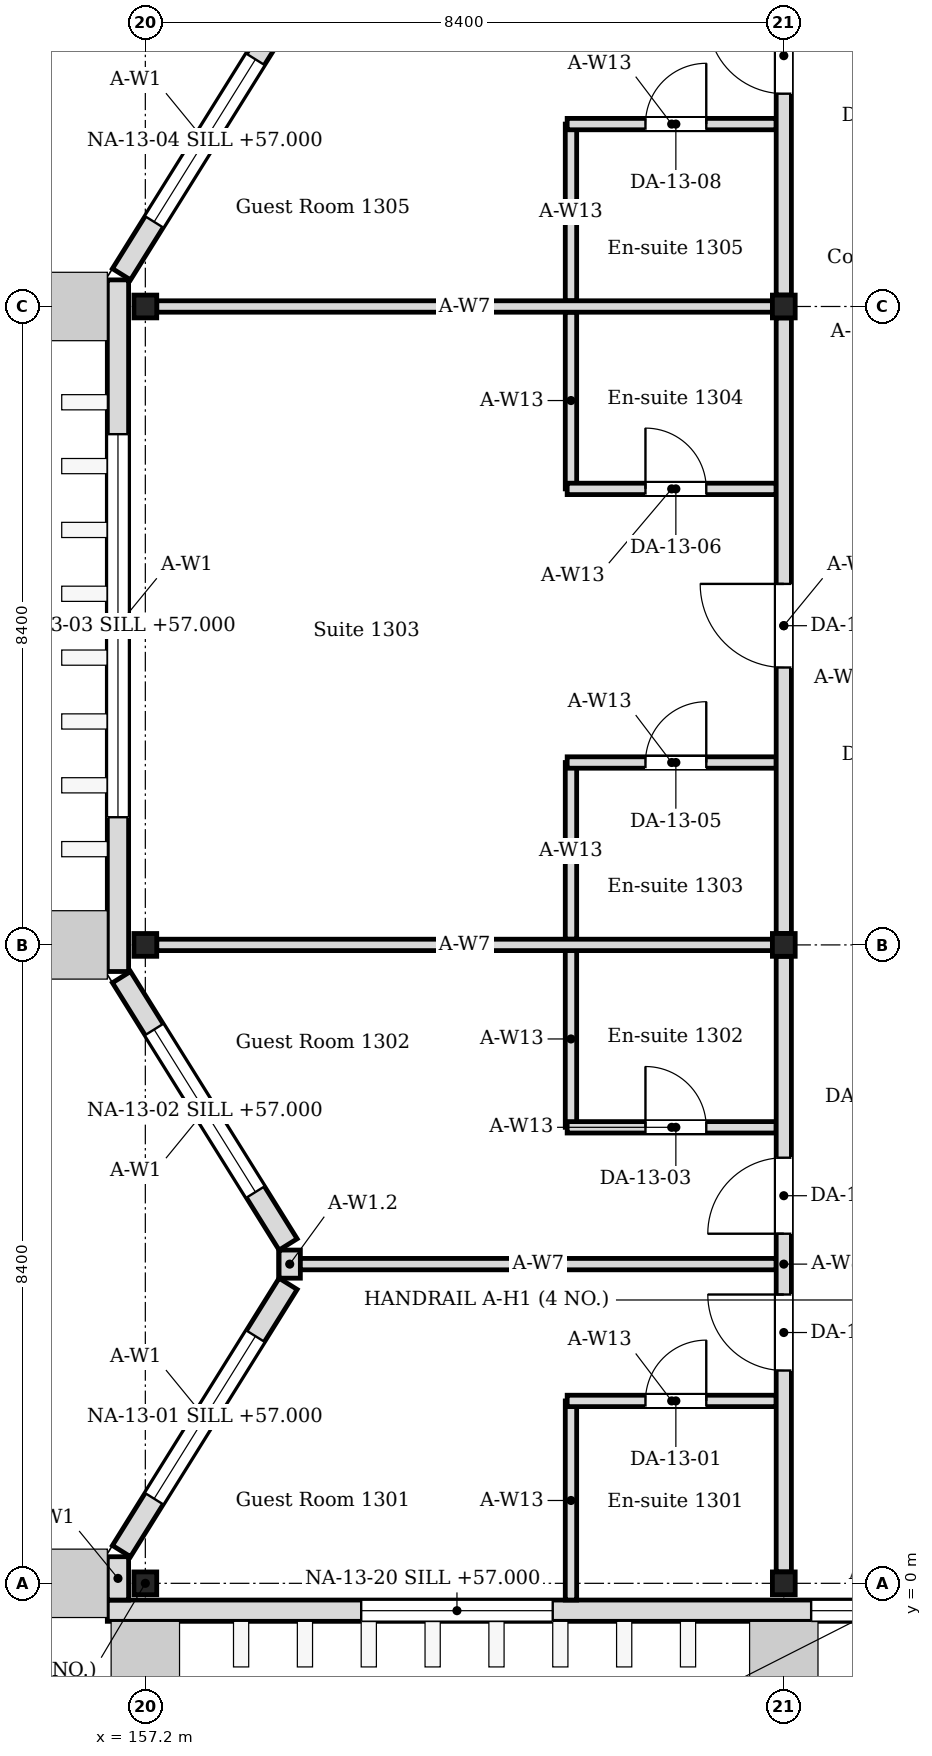
"""IFC4 building model, lengths in metres.
Left out: names, types, materials, properties, quantities, classifications, styles, units other than length and angle.
Written with IfcOpenShell. Run it as: python <this file> out.ifc"""

import sys

from ifc_helpers import new_model, si_unit, direction, frame, frame_2d, origin, origin_2d, place, context, subcontext, project, spatial, rectangle, i_section, extrude, element, fill, save


model = new_model("IFC4")
c1 = context("Model", 3, precision=1e-05, world=origin(), true_north=direction((0.0, 1.0)))
c2 = subcontext(c1, "Body", "Model", "MODEL_VIEW")
j1 = project(units=[si_unit("LENGTHUNIT", "METRE"), si_unit("PLANEANGLEUNIT", "RADIAN")], contexts=[c1])
p1 = place(None, origin())
s1 = spatial("IfcSite", under=j1, at=p1, CompositionType="ELEMENT")
p2 = place(p1, origin())
s2 = spatial("IfcBuilding", under=s1, at=p2, CompositionType="ELEMENT")
p3 = place(p2, frame((0.0, 0.0, 56.4)))
s3 = spatial("IfcBuildingStorey", under=s2, at=p3, CompositionType="ELEMENT", Elevation=56.4)
for number, where, z_axis, x_axis in (
    (1, (157.2, 0.0, 0.0), (0.0, 0.0, 1.0), (1.0, 0.0, 0.0)),
    (2, (157.2, 8.4, 0.0), (0.0, 0.0, 1.0), (1.0, 0.0, 0.0)),
    (3, (157.2, 16.8, 0.0), (0.0, 0.0, 1.0), (1.0, 0.0, 0.0)),
    (4, (165.6, 0.0, 0.0), (0.0, 0.0, 1.0), (1.0, 0.0, 0.0)),
    (5, (165.6, 8.4, 0.0), (0.0, 0.0, 1.0), (1.0, 0.0, 0.0)),
    (6, (165.6, 16.8, 0.0), (0.0, 0.0, 1.0), (1.0, 0.0, 0.0)),
):
    element("IfcColumn", number, at=place(p3, frame(where, z_axis=z_axis, x_axis=x_axis)), inside=s3, PredefinedType="COLUMN", context=c2, shape_type="SweptSolid", body=[
        extrude(i_section(OverallWidth=0.3, OverallDepth=0.3, WebThickness=0.01, FlangeThickness=0.015, FilletRadius=0.013, at=origin_2d()), origin(), (0.0, 0.0, 1.0), 4.2),
    ])
p4 = place(p3, frame((156.84, -0.22, 0.0), z_axis=(0.0, 0.0, 1.0), x_axis=(0.0, 1.0, 0.0)))
e7 = element("IfcWall", 7, at=p4, inside=s3, PredefinedType="SOLIDWALL", context=c2, shape_type="SweptSolid", body=[
    extrude(rectangle(XDim=0.57, YDim=0.28, at=frame_2d((0.285, 0.0))), origin(), (0.0, 0.0, 1.0), 4.05),
])
p5 = place(p3, frame((156.886, 0.424, 0.0), z_axis=(0.0, 0.0, 1.0), x_axis=(0.529018946142, 0.848610013271, 0.0)))
e8 = element("IfcWall", 8, at=p5, inside=s3, PredefinedType="SOLIDWALL", context=c2, shape_type="SweptSolid", body=[
    extrude(rectangle(XDim=4.144, YDim=0.28, at=frame_2d((2.072, 0.0))), origin(), (0.0, 0.0, 1.0), 4.05),
])
p6 = place(p5, frame((0.812, 0.0, 0.6)))
e9 = element("IfcOpeningElement", 9, at=p6, cuts=e8, PredefinedType="OPENING", context=c2, shape_type="SweptSolid", body=[
    extrude(rectangle(XDim=2.52, YDim=2.4, at=frame_2d((1.26, 1.2))), frame((0.0, 0.15, 0.0), z_axis=(0.0, -1.0, 0.0), x_axis=(1.0, 0.0, 0.0)), (0.0, 0.0, 1.0), 0.3),
])
p7 = place(p3, frame((159.079, 4.459, 0.0), z_axis=(0.0, 0.0, 1.0), x_axis=(-0.529018946142, 0.848610013271, 0.0)))
e10 = element("IfcWall", 10, at=p7, inside=s3, PredefinedType="SOLIDWALL", context=c2, shape_type="SweptSolid", body=[
    extrude(rectangle(XDim=4.144, YDim=0.28, at=frame_2d((2.072, 0.0))), origin(), (0.0, 0.0, 1.0), 4.05),
])
p8 = place(p7, frame((0.812, 0.0, 0.6)))
e11 = element("IfcOpeningElement", 11, at=p8, cuts=e10, PredefinedType="OPENING", context=c2, shape_type="SweptSolid", body=[
    extrude(rectangle(XDim=2.52, YDim=2.4, at=frame_2d((1.26, 1.2))), frame((0.0, 0.15, 0.0), z_axis=(0.0, -1.0, 0.0), x_axis=(1.0, 0.0, 0.0)), (0.0, 0.0, 1.0), 0.3),
])
p9 = place(p3, frame((159.1, 4.015, 0.0), z_axis=(0.0, 0.0, 1.0), x_axis=(0.0, 1.0, 0.0)))
e12 = element("IfcWall", 12, at=p9, inside=s3, PredefinedType="SOLIDWALL", context=c2, shape_type="SweptSolid", body=[
    extrude(rectangle(XDim=0.37, YDim=0.28, at=frame_2d((0.185, 0.0))), origin(), (0.0, 0.0, 1.0), 3.604),
])
p10 = place(p3, frame((156.84, 8.05, 0.0), z_axis=(0.0, 0.0, 1.0), x_axis=(0.0, 1.0, 0.0)))
e13 = element("IfcWall", 13, at=p10, inside=s3, PredefinedType="SOLIDWALL", context=c2, shape_type="SweptSolid", body=[
    extrude(rectangle(XDim=9.1, YDim=0.28, at=frame_2d((4.55, 0.0))), origin(), (0.0, 0.0, 1.0), 4.05),
])
p11 = place(p10, frame((2.03, 0.0, 0.6)))
e14 = element("IfcOpeningElement", 14, at=p11, cuts=e13, PredefinedType="OPENING", context=c2, shape_type="SweptSolid", body=[
    extrude(rectangle(XDim=5.04, YDim=2.4, at=frame_2d((2.52, 1.2))), frame((0.0, 0.15, 0.0), z_axis=(0.0, -1.0, 0.0), x_axis=(1.0, 0.0, 0.0)), (0.0, 0.0, 1.0), 0.3),
])
p12 = place(p3, frame((156.886, 17.224, 0.0), z_axis=(0.0, 0.0, 1.0), x_axis=(0.529018946142, 0.848610013271, 0.0)))
e15 = element("IfcWall", 15, at=p12, inside=s3, PredefinedType="SOLIDWALL", context=c2, shape_type="SweptSolid", body=[
    extrude(rectangle(XDim=4.144, YDim=0.28, at=frame_2d((2.072, 0.0))), origin(), (0.0, 0.0, 1.0), 4.05),
])
p13 = place(p12, frame((0.812, 0.0, 0.6)))
e16 = element("IfcOpeningElement", 16, at=p13, cuts=e15, PredefinedType="OPENING", context=c2, shape_type="SweptSolid", body=[
    extrude(rectangle(XDim=2.52, YDim=2.4, at=frame_2d((1.26, 1.2))), frame((0.0, 0.15, 0.0), z_axis=(0.0, -1.0, 0.0), x_axis=(1.0, 0.0, 0.0)), (0.0, 0.0, 1.0), 0.3),
])
p14 = place(p3, frame((156.7, -0.36, 0.0), z_axis=(0.0, 0.0, 1.0), x_axis=(1.0, 0.0, 0.0)))
e17 = element("IfcWall", 17, at=p14, inside=s3, PredefinedType="SOLIDWALL", context=c2, shape_type="SweptSolid", body=[
    extrude(rectangle(XDim=20.2, YDim=0.28, at=frame_2d((10.1, 0.0))), origin(), (0.0, 0.0, 1.0), 4.05),
])
p15 = place(p14, frame((9.26, 0.0, 0.6)))
e18 = element("IfcOpeningElement", 18, at=p15, cuts=e17, PredefinedType="OPENING", context=c2, shape_type="SweptSolid", body=[
    extrude(rectangle(XDim=1.68, YDim=2.4, at=frame_2d((0.84, 1.2))), frame((0.0, 0.15, 0.0), z_axis=(0.0, -1.0, 0.0), x_axis=(1.0, 0.0, 0.0)), (0.0, 0.0, 1.0), 0.3),
])
p16 = place(p14, frame((3.34, 0.0, 0.6)))
e19 = element("IfcOpeningElement", 19, at=p16, cuts=e17, PredefinedType="OPENING", context=c2, shape_type="SweptSolid", body=[
    extrude(rectangle(XDim=2.52, YDim=2.4, at=frame_2d((1.26, 1.2))), frame((0.0, 0.15, 0.0), z_axis=(0.0, -1.0, 0.0), x_axis=(1.0, 0.0, 0.0)), (0.0, 0.0, 1.0), 0.3),
])
p17 = place(p3, frame((162.8, -0.22, 0.0), z_axis=(0.0, 0.0, 1.0), x_axis=(0.0, 1.0, 0.0)))
e20 = element("IfcWall", 20, at=p17, inside=s3, PredefinedType="PARTITIONING", context=c2, shape_type="SweptSolid", body=[
    extrude(rectangle(XDim=2.62, YDim=0.15, at=frame_2d((1.31, 0.0))), origin(), (0.0, 0.0, 1.0), 4.05),
])
p18 = place(p3, frame((162.75, 2.4, 0.0), z_axis=(0.0, 0.0, 1.0), x_axis=(1.0, 0.0, 0.0)))
e21 = element("IfcWall", 21, at=p18, inside=s3, PredefinedType="PARTITIONING", context=c2, shape_type="SweptSolid", body=[
    extrude(rectangle(XDim=2.75, YDim=0.15, at=frame_2d((1.375, 0.0))), origin(), (0.0, 0.0, 1.0), 4.05),
])
p19 = place(p18, frame((1.03, 0.0, 0.0)))
e22 = element("IfcOpeningElement", 22, at=p19, cuts=e21, PredefinedType="OPENING", context=c2, shape_type="SweptSolid", body=[
    extrude(rectangle(XDim=0.8, YDim=2.1, at=frame_2d((0.4, 1.05))), frame((0.0, 0.085, 0.0), z_axis=(0.0, -1.0, 0.0), x_axis=(1.0, 0.0, 0.0)), (0.0, 0.0, 1.0), 0.17),
])
p20 = place(p3, frame((162.8, 6.0, 0.0), z_axis=(0.0, 0.0, 1.0), x_axis=(0.0, 1.0, 0.0)))
e23 = element("IfcWall", 23, at=p20, inside=s3, PredefinedType="PARTITIONING", context=c2, shape_type="SweptSolid", body=[
    extrude(rectangle(XDim=2.325, YDim=0.15, at=frame_2d((1.163, 0.0))), origin(), (0.0, 0.0, 1.0), 4.05),
])
p21 = place(p3, frame((162.75, 6.0, 0.0), z_axis=(0.0, 0.0, 1.0), x_axis=(1.0, 0.0, 0.0)))
e24 = element("IfcWall", 24, at=p21, inside=s3, PredefinedType="PARTITIONING", context=c2, shape_type="SweptSolid", body=[
    extrude(rectangle(XDim=2.75, YDim=0.15, at=frame_2d((1.375, 0.0))), origin(), (0.0, 0.0, 1.0), 4.05),
])
p22 = place(p21, frame((1.03, 0.0, 0.0)))
e25 = element("IfcOpeningElement", 25, at=p22, cuts=e24, PredefinedType="OPENING", context=c2, shape_type="SweptSolid", body=[
    extrude(rectangle(XDim=0.8, YDim=2.1, at=frame_2d((0.4, 1.05))), frame((0.0, 0.085, 0.0), z_axis=(0.0, -1.0, 0.0), x_axis=(1.0, 0.0, 0.0)), (0.0, 0.0, 1.0), 0.17),
])
p23 = place(p3, frame((162.8, 8.475, 0.0), z_axis=(0.0, 0.0, 1.0), x_axis=(0.0, 1.0, 0.0)))
e26 = element("IfcWall", 26, at=p23, inside=s3, PredefinedType="PARTITIONING", context=c2, shape_type="SweptSolid", body=[
    extrude(rectangle(XDim=2.325, YDim=0.15, at=frame_2d((1.163, 0.0))), origin(), (0.0, 0.0, 1.0), 4.05),
])
p24 = place(p3, frame((162.75, 10.8, 0.0), z_axis=(0.0, 0.0, 1.0), x_axis=(1.0, 0.0, 0.0)))
e27 = element("IfcWall", 27, at=p24, inside=s3, PredefinedType="PARTITIONING", context=c2, shape_type="SweptSolid", body=[
    extrude(rectangle(XDim=2.75, YDim=0.15, at=frame_2d((1.375, 0.0))), origin(), (0.0, 0.0, 1.0), 4.05),
])
p25 = place(p24, frame((1.03, 0.0, 0.0)))
e28 = element("IfcOpeningElement", 28, at=p25, cuts=e27, PredefinedType="OPENING", context=c2, shape_type="SweptSolid", body=[
    extrude(rectangle(XDim=0.8, YDim=2.1, at=frame_2d((0.4, 1.05))), frame((0.0, 0.085, 0.0), z_axis=(0.0, -1.0, 0.0), x_axis=(1.0, 0.0, 0.0)), (0.0, 0.0, 1.0), 0.17),
])
p26 = place(p3, frame((162.8, 14.4, 0.0), z_axis=(0.0, 0.0, 1.0), x_axis=(0.0, 1.0, 0.0)))
e29 = element("IfcWall", 29, at=p26, inside=s3, PredefinedType="PARTITIONING", context=c2, shape_type="SweptSolid", body=[
    extrude(rectangle(XDim=2.325, YDim=0.15, at=frame_2d((1.163, 0.0))), origin(), (0.0, 0.0, 1.0), 4.05),
])
p27 = place(p3, frame((162.75, 14.4, 0.0), z_axis=(0.0, 0.0, 1.0), x_axis=(1.0, 0.0, 0.0)))
e30 = element("IfcWall", 30, at=p27, inside=s3, PredefinedType="PARTITIONING", context=c2, shape_type="SweptSolid", body=[
    extrude(rectangle(XDim=2.75, YDim=0.15, at=frame_2d((1.375, 0.0))), origin(), (0.0, 0.0, 1.0), 4.05),
])
p28 = place(p27, frame((1.03, 0.0, 0.0)))
e31 = element("IfcOpeningElement", 31, at=p28, cuts=e30, PredefinedType="OPENING", context=c2, shape_type="SweptSolid", body=[
    extrude(rectangle(XDim=0.8, YDim=2.1, at=frame_2d((0.4, 1.05))), frame((0.0, 0.085, 0.0), z_axis=(0.0, -1.0, 0.0), x_axis=(1.0, 0.0, 0.0)), (0.0, 0.0, 1.0), 0.17),
])
p29 = place(p3, frame((162.8, 16.875, 0.0), z_axis=(0.0, 0.0, 1.0), x_axis=(0.0, 1.0, 0.0)))
e32 = element("IfcWall", 32, at=p29, inside=s3, PredefinedType="PARTITIONING", context=c2, shape_type="SweptSolid", body=[
    extrude(rectangle(XDim=2.325, YDim=0.15, at=frame_2d((1.163, 0.0))), origin(), (0.0, 0.0, 1.0), 4.05),
])
p30 = place(p3, frame((162.75, 19.2, 0.0), z_axis=(0.0, 0.0, 1.0), x_axis=(1.0, 0.0, 0.0)))
e33 = element("IfcWall", 33, at=p30, inside=s3, PredefinedType="PARTITIONING", context=c2, shape_type="SweptSolid", body=[
    extrude(rectangle(XDim=2.75, YDim=0.15, at=frame_2d((1.375, 0.0))), origin(), (0.0, 0.0, 1.0), 4.05),
])
p31 = place(p30, frame((1.03, 0.0, 0.0)))
e34 = element("IfcOpeningElement", 34, at=p31, cuts=e33, PredefinedType="OPENING", context=c2, shape_type="SweptSolid", body=[
    extrude(rectangle(XDim=0.8, YDim=2.1, at=frame_2d((0.4, 1.05))), frame((0.0, 0.085, 0.0), z_axis=(0.0, -1.0, 0.0), x_axis=(1.0, 0.0, 0.0)), (0.0, 0.0, 1.0), 0.17),
])
for number, where, z_axis, x_axis in (
    (35, (157.35, 8.4, 0.0), (0.0, 0.0, 1.0), (1.0, 0.0, 0.0)),
    (36, (157.35, 16.8, 0.0), (0.0, 0.0, 1.0), (1.0, 0.0, 0.0)),
):
    element("IfcWall", number, at=place(p3, frame(where, z_axis=z_axis, x_axis=x_axis)), inside=s3, PredefinedType="PARTITIONING", context=c2, shape_type="SweptSolid", body=[
        extrude(rectangle(XDim=8.1, YDim=0.15, at=frame_2d((4.05, 0.0))), origin(), (0.0, 0.0, 1.0), 3.604),
    ])
p32 = place(p3, frame((159.24, 4.2, 0.0), z_axis=(0.0, 0.0, 1.0), x_axis=(1.0, 0.0, 0.0)))
e37 = element("IfcWall", 37, at=p32, inside=s3, PredefinedType="PARTITIONING", context=c2, shape_type="SweptSolid", body=[
    extrude(rectangle(XDim=6.26, YDim=0.15, at=frame_2d((3.13, 0.0))), origin(), (0.0, 0.0, 1.0), 3.604),
])
p33 = place(p3, frame((165.6, 0.15, 0.0), z_axis=(0.0, 0.0, 1.0), x_axis=(0.0, 1.0, 0.0)))
e38 = element("IfcWall", 38, at=p33, inside=s3, PredefinedType="PARTITIONING", context=c2, shape_type="SweptSolid", body=[
    extrude(rectangle(XDim=8.1, YDim=0.2, at=frame_2d((4.05, 0.0))), origin(), (0.0, 0.0, 1.0), 3.45),
])
p34 = place(p33, frame((2.65, 0.0, 0.0)))
e39 = element("IfcOpeningElement", 39, at=p34, cuts=e38, PredefinedType="OPENING", context=c2, shape_type="SweptSolid", body=[
    extrude(rectangle(XDim=1.0, YDim=2.4, at=frame_2d((0.5, 1.2))), frame((0.0, 0.11, 0.0), z_axis=(0.0, -1.0, 0.0), x_axis=(1.0, 0.0, 0.0)), (0.0, 0.0, 1.0), 0.22),
])
p35 = place(p33, frame((4.45, 0.0, 0.0)))
e40 = element("IfcOpeningElement", 40, at=p35, cuts=e38, PredefinedType="OPENING", context=c2, shape_type="SweptSolid", body=[
    extrude(rectangle(XDim=1.0, YDim=2.4, at=frame_2d((0.5, 1.2))), frame((0.0, 0.11, 0.0), z_axis=(0.0, -1.0, 0.0), x_axis=(1.0, 0.0, 0.0)), (0.0, 0.0, 1.0), 0.22),
])
p36 = place(p3, frame((165.6, 8.55, 0.0), z_axis=(0.0, 0.0, 1.0), x_axis=(0.0, 1.0, 0.0)))
e41 = element("IfcWall", 41, at=p36, inside=s3, PredefinedType="PARTITIONING", context=c2, shape_type="SweptSolid", body=[
    extrude(rectangle(XDim=8.1, YDim=0.2, at=frame_2d((4.05, 0.0))), origin(), (0.0, 0.0, 1.0), 3.45),
])
p37 = place(p36, frame((3.5, 0.0, 0.0)))
e42 = element("IfcOpeningElement", 42, at=p37, cuts=e41, PredefinedType="OPENING", context=c2, shape_type="SweptSolid", body=[
    extrude(rectangle(XDim=1.1, YDim=2.4, at=frame_2d((0.55, 1.2))), frame((0.0, 0.11, 0.0), z_axis=(0.0, -1.0, 0.0), x_axis=(1.0, 0.0, 0.0)), (0.0, 0.0, 1.0), 0.22),
])
p38 = place(p3, frame((165.6, 16.95, 0.0), z_axis=(0.0, 0.0, 1.0), x_axis=(0.0, 1.0, 0.0)))
e43 = element("IfcWall", 43, at=p38, inside=s3, PredefinedType="PARTITIONING", context=c2, shape_type="SweptSolid", body=[
    extrude(rectangle(XDim=8.1, YDim=0.2, at=frame_2d((4.05, 0.0))), origin(), (0.0, 0.0, 1.0), 3.45),
])
p39 = place(p38, frame((2.65, 0.0, 0.0)))
e44 = element("IfcOpeningElement", 44, at=p39, cuts=e43, PredefinedType="OPENING", context=c2, shape_type="SweptSolid", body=[
    extrude(rectangle(XDim=1.0, YDim=2.4, at=frame_2d((0.5, 1.2))), frame((0.0, 0.11, 0.0), z_axis=(0.0, -1.0, 0.0), x_axis=(1.0, 0.0, 0.0)), (0.0, 0.0, 1.0), 0.22),
])
p40 = place(p38, frame((4.45, 0.0, 0.0)))
e45 = element("IfcOpeningElement", 45, at=p40, cuts=e43, PredefinedType="OPENING", context=c2, shape_type="SweptSolid", body=[
    extrude(rectangle(XDim=1.0, YDim=2.4, at=frame_2d((0.5, 1.2))), frame((0.0, 0.11, 0.0), z_axis=(0.0, -1.0, 0.0), x_axis=(1.0, 0.0, 0.0)), (0.0, 0.0, 1.0), 0.22),
])
p41 = place(p6, origin())
e46 = element("IfcWindow", 46, at=p41, inside=s3, PartitioningType="SINGLE_PANEL", PredefinedType="WINDOW", context=c2, shape_type="SweptSolid", body=[
    extrude(rectangle(XDim=2.52, YDim=2.4, at=frame_2d((1.26, 1.2))), frame((0.0, 0.03, 0.0), z_axis=(0.0, -1.0, 0.0), x_axis=(1.0, 0.0, 0.0)), (0.0, 0.0, 1.0), 0.06),
])
fill(e9, e46)
p42 = place(p8, origin())
e47 = element("IfcWindow", 47, at=p42, inside=s3, PartitioningType="SINGLE_PANEL", PredefinedType="WINDOW", context=c2, shape_type="SweptSolid", body=[
    extrude(rectangle(XDim=2.52, YDim=2.4, at=frame_2d((1.26, 1.2))), frame((0.0, 0.03, 0.0), z_axis=(0.0, -1.0, 0.0), x_axis=(1.0, 0.0, 0.0)), (0.0, 0.0, 1.0), 0.06),
])
fill(e11, e47)
p43 = place(p11, origin())
e48 = element("IfcWindow", 48, at=p43, inside=s3, PartitioningType="SINGLE_PANEL", PredefinedType="WINDOW", context=c2, shape_type="SweptSolid", body=[
    extrude(rectangle(XDim=5.04, YDim=2.4, at=frame_2d((2.52, 1.2))), frame((0.0, 0.03, 0.0), z_axis=(0.0, -1.0, 0.0), x_axis=(1.0, 0.0, 0.0)), (0.0, 0.0, 1.0), 0.06),
])
fill(e14, e48)
p44 = place(p13, origin())
e49 = element("IfcWindow", 49, at=p44, inside=s3, PartitioningType="SINGLE_PANEL", PredefinedType="WINDOW", context=c2, shape_type="SweptSolid", body=[
    extrude(rectangle(XDim=2.52, YDim=2.4, at=frame_2d((1.26, 1.2))), frame((0.0, 0.03, 0.0), z_axis=(0.0, -1.0, 0.0), x_axis=(1.0, 0.0, 0.0)), (0.0, 0.0, 1.0), 0.06),
])
fill(e16, e49)
p45 = place(p15, origin())
e50 = element("IfcWindow", 50, at=p45, inside=s3, PartitioningType="SINGLE_PANEL", PredefinedType="WINDOW", context=c2, shape_type="SweptSolid", body=[
    extrude(rectangle(XDim=1.68, YDim=2.4, at=frame_2d((0.84, 1.2))), frame((0.0, 0.03, 0.0), z_axis=(0.0, -1.0, 0.0), x_axis=(1.0, 0.0, 0.0)), (0.0, 0.0, 1.0), 0.06),
])
fill(e18, e50)
p46 = place(p16, origin())
e51 = element("IfcWindow", 51, at=p46, inside=s3, PartitioningType="SINGLE_PANEL", PredefinedType="WINDOW", context=c2, shape_type="SweptSolid", body=[
    extrude(rectangle(XDim=2.52, YDim=2.4, at=frame_2d((1.26, 1.2))), frame((0.0, 0.03, 0.0), z_axis=(0.0, -1.0, 0.0), x_axis=(1.0, 0.0, 0.0)), (0.0, 0.0, 1.0), 0.06),
])
fill(e19, e51)
p47 = place(p19, origin())
e52 = element("IfcDoor", 52, at=p47, inside=s3, OperationType="SINGLE_SWING_RIGHT", PredefinedType="DOOR", context=c2, shape_type="SweptSolid", body=[
    extrude(rectangle(XDim=0.8, YDim=2.1, at=frame_2d((0.4, 1.05))), frame((0.0, 0.025, 0.0), z_axis=(0.0, -1.0, 0.0), x_axis=(1.0, 0.0, 0.0)), (0.0, 0.0, 1.0), 0.05),
])
fill(e22, e52)
p48 = place(p34, origin())
e53 = element("IfcDoor", 53, at=p48, inside=s3, OperationType="SINGLE_SWING_RIGHT", PredefinedType="DOOR", context=c2, shape_type="SweptSolid", body=[
    extrude(rectangle(XDim=1.0, YDim=2.4, at=frame_2d((0.5, 1.2))), frame((0.0, 0.025, 0.0), z_axis=(0.0, -1.0, 0.0), x_axis=(1.0, 0.0, 0.0)), (0.0, 0.0, 1.0), 0.05),
])
fill(e39, e53)
p49 = place(p22, origin())
e54 = element("IfcDoor", 54, at=p49, inside=s3, OperationType="SINGLE_SWING_LEFT", PredefinedType="DOOR", context=c2, shape_type="SweptSolid", body=[
    extrude(rectangle(XDim=0.8, YDim=2.1, at=frame_2d((0.4, 1.05))), frame((0.0, 0.025, 0.0), z_axis=(0.0, -1.0, 0.0), x_axis=(1.0, 0.0, 0.0)), (0.0, 0.0, 1.0), 0.05),
])
fill(e25, e54)
p50 = place(p35, origin())
e55 = element("IfcDoor", 55, at=p50, inside=s3, OperationType="SINGLE_SWING_LEFT", PredefinedType="DOOR", context=c2, shape_type="SweptSolid", body=[
    extrude(rectangle(XDim=1.0, YDim=2.4, at=frame_2d((0.5, 1.2))), frame((0.0, 0.025, 0.0), z_axis=(0.0, -1.0, 0.0), x_axis=(1.0, 0.0, 0.0)), (0.0, 0.0, 1.0), 0.05),
])
fill(e40, e55)
p51 = place(p25, origin())
e56 = element("IfcDoor", 56, at=p51, inside=s3, OperationType="SINGLE_SWING_RIGHT", PredefinedType="DOOR", context=c2, shape_type="SweptSolid", body=[
    extrude(rectangle(XDim=0.8, YDim=2.1, at=frame_2d((0.4, 1.05))), frame((0.0, 0.025, 0.0), z_axis=(0.0, -1.0, 0.0), x_axis=(1.0, 0.0, 0.0)), (0.0, 0.0, 1.0), 0.05),
])
fill(e28, e56)
p52 = place(p28, origin())
e57 = element("IfcDoor", 57, at=p52, inside=s3, OperationType="SINGLE_SWING_LEFT", PredefinedType="DOOR", context=c2, shape_type="SweptSolid", body=[
    extrude(rectangle(XDim=0.8, YDim=2.1, at=frame_2d((0.4, 1.05))), frame((0.0, 0.025, 0.0), z_axis=(0.0, -1.0, 0.0), x_axis=(1.0, 0.0, 0.0)), (0.0, 0.0, 1.0), 0.05),
])
fill(e31, e57)
p53 = place(p37, origin())
e58 = element("IfcDoor", 58, at=p53, inside=s3, OperationType="SINGLE_SWING_RIGHT", PredefinedType="DOOR", context=c2, shape_type="SweptSolid", body=[
    extrude(rectangle(XDim=1.1, YDim=2.4, at=frame_2d((0.55, 1.2))), frame((0.0, 0.025, 0.0), z_axis=(0.0, -1.0, 0.0), x_axis=(1.0, 0.0, 0.0)), (0.0, 0.0, 1.0), 0.05),
])
fill(e42, e58)
p54 = place(p31, origin())
e59 = element("IfcDoor", 59, at=p54, inside=s3, OperationType="SINGLE_SWING_RIGHT", PredefinedType="DOOR", context=c2, shape_type="SweptSolid", body=[
    extrude(rectangle(XDim=0.8, YDim=2.1, at=frame_2d((0.4, 1.05))), frame((0.0, 0.025, 0.0), z_axis=(0.0, -1.0, 0.0), x_axis=(1.0, 0.0, 0.0)), (0.0, 0.0, 1.0), 0.05),
])
fill(e34, e59)
p55 = place(p39, origin())
e60 = element("IfcDoor", 60, at=p55, inside=s3, OperationType="SINGLE_SWING_RIGHT", PredefinedType="DOOR", context=c2, shape_type="SweptSolid", body=[
    extrude(rectangle(XDim=1.0, YDim=2.4, at=frame_2d((0.5, 1.2))), frame((0.0, 0.025, 0.0), z_axis=(0.0, -1.0, 0.0), x_axis=(1.0, 0.0, 0.0)), (0.0, 0.0, 1.0), 0.05),
])
fill(e44, e60)
save(model, sys.argv[1])
